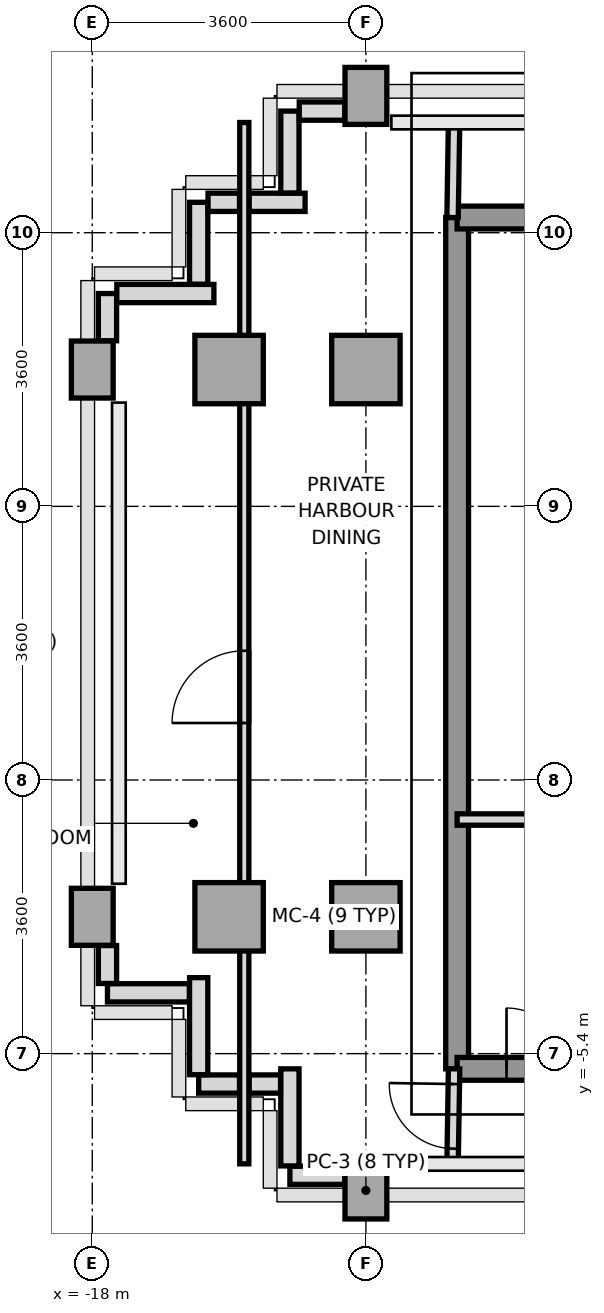
"""IFC4 building model, lengths in metres.
Left out: names, types, materials, properties, quantities, classifications, styles, units other than length and angle.
Written with IfcOpenShell. Run it as: python <this file> out.ifc"""

import sys

from ifc_helpers import new_model, si_unit, direction, frame, frame_2d, origin, origin_2d, place, context, subcontext, project, spatial, rectangle, extrude, source, transform, mapped, element, fill, save


model = new_model("IFC4")
c1 = context("Model", 3, precision=1e-05, world=origin(), true_north=direction((0.0, 1.0)))
c2 = subcontext(c1, "Body", "Model", "MODEL_VIEW")
j1 = project(units=[si_unit("LENGTHUNIT", "METRE"), si_unit("PLANEANGLEUNIT", "RADIAN")], contexts=[c1])
p1 = place(None, origin())
s1 = spatial("IfcSite", under=j1, at=p1, CompositionType="ELEMENT")
p2 = place(p1, origin())
s2 = spatial("IfcBuilding", under=s1, at=p2, CompositionType="ELEMENT")
p3 = place(p2, frame((0.0, 0.0, 249.2)))
s3 = spatial("IfcBuildingStorey", under=s2, at=p3, CompositionType="ELEMENT", Elevation=249.2)
m1 = source(origin(), c2, "Body", "SweptSolid", [
    extrude(rectangle(XDim=0.55, YDim=0.75, at=origin_2d()), origin(), (0.0, 0.0, 1.0), 3.01),
])
for number, where, z_axis, x_axis in (
    (1, (-18.0, -3.6, 0.0), (0.0, 0.0, 1.0), (1.0, 0.0, 0.0)),
    (2, (-18.0, 3.6, 0.0), (0.0, 0.0, 1.0), (1.0, 0.0, 0.0)),
):
    element("IfcColumn", number, at=place(p3, frame(where, z_axis=z_axis, x_axis=x_axis)), inside=s3, PredefinedType="COLUMN", context=c2, shape_type="MappedRepresentation", body=[
        mapped(m1, transform((0.0, 0.0, 0.0), x_axis=(1.0, 0.0, 0.0), y_axis=(0.0, 1.0, 0.0), z_axis=(0.0, 0.0, 1.0), scale=1.0)),
    ])
m2 = source(origin(), c2, "Body", "SweptSolid", [
    extrude(rectangle(XDim=0.9, YDim=0.9, at=origin_2d()), origin(), (0.0, 0.0, 1.0), 3.01),
])
for number, where, z_axis, x_axis in (
    (3, (-16.2, -3.6, 0.0), (0.0, 0.0, 1.0), (1.0, 0.0, 0.0)),
    (4, (-16.2, 3.6, 0.0), (0.0, 0.0, 1.0), (1.0, 0.0, 0.0)),
):
    element("IfcColumn", number, at=place(p3, frame(where, z_axis=z_axis, x_axis=x_axis)), inside=s3, PredefinedType="COLUMN", context=c2, shape_type="MappedRepresentation", body=[
        mapped(m2, transform((0.0, 0.0, 0.0), x_axis=(1.0, 0.0, 0.0), y_axis=(0.0, 1.0, 0.0), z_axis=(0.0, 0.0, 1.0), scale=1.0)),
    ])
p4 = place(p3, frame((-14.4, -7.2, 0.0), z_axis=(0.0, 0.0, 1.0), x_axis=(1.0, 0.0, 0.0)))
e5 = element("IfcColumn", 5, at=p4, inside=s3, PredefinedType="COLUMN", context=c2, shape_type="MappedRepresentation", body=[
    mapped(m1, transform((0.0, 0.0, 0.0), x_axis=(1.0, 0.0, 0.0), y_axis=(0.0, 1.0, 0.0), z_axis=(0.0, 0.0, 1.0), scale=1.0)),
])
for number, where, z_axis, x_axis in (
    (6, (-14.4, -3.6, 0.0), (0.0, 0.0, 1.0), (1.0, 0.0, 0.0)),
    (7, (-14.4, 3.6, 0.0), (0.0, 0.0, 1.0), (1.0, 0.0, 0.0)),
):
    element("IfcColumn", number, at=place(p3, frame(where, z_axis=z_axis, x_axis=x_axis)), inside=s3, PredefinedType="COLUMN", context=c2, shape_type="MappedRepresentation", body=[
        mapped(m2, transform((0.0, 0.0, 0.0), x_axis=(1.0, 0.0, 0.0), y_axis=(0.0, 1.0, 0.0), z_axis=(0.0, 0.0, 1.0), scale=1.0)),
    ])
p5 = place(p3, frame((-14.4, 7.2, 0.0), z_axis=(0.0, 0.0, 1.0), x_axis=(1.0, 0.0, 0.0)))
e8 = element("IfcColumn", 8, at=p5, inside=s3, PredefinedType="COLUMN", context=c2, shape_type="MappedRepresentation", body=[
    mapped(m1, transform((0.0, 0.0, 0.0), x_axis=(1.0, 0.0, 0.0), y_axis=(0.0, 1.0, 0.0), z_axis=(0.0, 0.0, 1.0), scale=1.0)),
])
p6 = place(p3, frame((-14.678, -7.0, 0.0), z_axis=(0.0, 0.0, 1.0), x_axis=(-1.0, 0.0, 0.0)))
e9 = element("IfcWall", 9, at=p6, inside=s3, PredefinedType="PARAPET", context=c2, shape_type="SweptSolid", body=[
    extrude(rectangle(XDim=0.722, YDim=0.24, at=frame_2d((0.361, 0.0))), origin(), (0.0, 0.0, 1.0), 1.15),
])
p7 = place(p3, frame((-15.4, -6.877, 0.0), z_axis=(0.0, 0.0, 1.0), x_axis=(0.0, 1.0, 0.0)))
e10 = element("IfcWall", 10, at=p7, inside=s3, PredefinedType="PARAPET", context=c2, shape_type="SweptSolid", body=[
    extrude(rectangle(XDim=1.277, YDim=0.24, at=frame_2d((0.638, 0.0))), origin(), (0.0, 0.0, 1.0), 1.15),
])
p8 = place(p3, frame((-15.523, -5.8, 0.0), z_axis=(0.0, 0.0, 1.0), x_axis=(-1.0, 0.0, 0.0)))
e11 = element("IfcWall", 11, at=p8, inside=s3, PredefinedType="PARAPET", context=c2, shape_type="SweptSolid", body=[
    extrude(rectangle(XDim=0.414, YDim=0.24, at=frame_2d((0.207, 0.0))), origin(), (0.0, 0.0, 1.0), 1.15),
])
p9 = place(p3, frame((-16.063, -5.8, 0.0), z_axis=(0.0, 0.0, 1.0), x_axis=(-1.0, 0.0, 0.0)))
e12 = element("IfcWall", 12, at=p9, inside=s3, PredefinedType="PARAPET", context=c2, shape_type="SweptSolid", body=[
    extrude(rectangle(XDim=0.537, YDim=0.24, at=frame_2d((0.269, 0.0))), origin(), (0.0, 0.0, 1.0), 1.15),
])
p10 = place(p3, frame((-16.6, -5.677, 0.0), z_axis=(0.0, 0.0, 1.0), x_axis=(0.0, 1.0, 0.0)))
e13 = element("IfcWall", 13, at=p10, inside=s3, PredefinedType="PARAPET", context=c2, shape_type="SweptSolid", body=[
    extrude(rectangle(XDim=1.277, YDim=0.24, at=frame_2d((0.639, 0.0))), origin(), (0.0, 0.0, 1.0), 1.15),
])
p11 = place(p3, frame((-16.723, -4.6, 0.0), z_axis=(0.0, 0.0, 1.0), x_axis=(-1.0, 0.0, 0.0)))
e14 = element("IfcWall", 14, at=p11, inside=s3, PredefinedType="PARAPET", context=c2, shape_type="SweptSolid", body=[
    extrude(rectangle(XDim=1.077, YDim=0.24, at=frame_2d((0.539, 0.0))), origin(), (0.0, 0.0, 1.0), 1.15),
])
p12 = place(p3, frame((-17.8, -4.477, 0.0), z_axis=(0.0, 0.0, 1.0), x_axis=(0.0, 1.0, 0.0)))
e15 = element("IfcWall", 15, at=p12, inside=s3, PredefinedType="PARAPET", context=c2, shape_type="SweptSolid", body=[
    extrude(rectangle(XDim=0.499, YDim=0.24, at=frame_2d((0.25, 0.0))), origin(), (0.0, 0.0, 1.0), 1.15),
])
p13 = place(p3, frame((-17.8, 3.978, 0.0), z_axis=(0.0, 0.0, 1.0), x_axis=(0.0, 1.0, 0.0)))
e16 = element("IfcWall", 16, at=p13, inside=s3, PredefinedType="PARAPET", context=c2, shape_type="SweptSolid", body=[
    extrude(rectangle(XDim=0.622, YDim=0.24, at=frame_2d((0.311, 0.0))), origin(), (0.0, 0.0, 1.0), 1.15),
])
p14 = place(p3, frame((-17.677, 4.6, 0.0), z_axis=(0.0, 0.0, 1.0), x_axis=(1.0, 0.0, 0.0)))
e17 = element("IfcWall", 17, at=p14, inside=s3, PredefinedType="PARAPET", context=c2, shape_type="SweptSolid", body=[
    extrude(rectangle(XDim=1.277, YDim=0.24, at=frame_2d((0.639, 0.0))), origin(), (0.0, 0.0, 1.0), 1.15),
])
p15 = place(p3, frame((-16.6, 4.723, 0.0), z_axis=(0.0, 0.0, 1.0), x_axis=(0.0, 1.0, 0.0)))
e18 = element("IfcWall", 18, at=p15, inside=s3, PredefinedType="PARAPET", context=c2, shape_type="SweptSolid", body=[
    extrude(rectangle(XDim=1.077, YDim=0.24, at=frame_2d((0.539, 0.0))), origin(), (0.0, 0.0, 1.0), 1.15),
])
p16 = place(p3, frame((-16.477, 5.8, 0.0), z_axis=(0.0, 0.0, 1.0), x_axis=(1.0, 0.0, 0.0)))
e19 = element("IfcWall", 19, at=p16, inside=s3, PredefinedType="PARAPET", context=c2, shape_type="SweptSolid", body=[
    extrude(rectangle(XDim=0.414, YDim=0.24, at=frame_2d((0.207, 0.0))), origin(), (0.0, 0.0, 1.0), 1.15),
])
p17 = place(p3, frame((-15.937, 5.8, 0.0), z_axis=(0.0, 0.0, 1.0), x_axis=(1.0, 0.0, 0.0)))
e20 = element("IfcWall", 20, at=p17, inside=s3, PredefinedType="PARAPET", context=c2, shape_type="SweptSolid", body=[
    extrude(rectangle(XDim=0.737, YDim=0.24, at=frame_2d((0.369, 0.0))), origin(), (0.0, 0.0, 1.0), 1.15),
])
p18 = place(p3, frame((-15.4, 5.923, 0.0), z_axis=(0.0, 0.0, 1.0), x_axis=(0.0, 1.0, 0.0)))
e21 = element("IfcWall", 21, at=p18, inside=s3, PredefinedType="PARAPET", context=c2, shape_type="SweptSolid", body=[
    extrude(rectangle(XDim=1.077, YDim=0.24, at=frame_2d((0.539, 0.0))), origin(), (0.0, 0.0, 1.0), 1.15),
])
p19 = place(p3, frame((-15.277, 7.0, 0.0), z_axis=(0.0, 0.0, 1.0), x_axis=(1.0, 0.0, 0.0)))
e22 = element("IfcWall", 22, at=p19, inside=s3, PredefinedType="PARAPET", context=c2, shape_type="SweptSolid", body=[
    extrude(rectangle(XDim=0.599, YDim=0.24, at=frame_2d((0.3, 0.0))), origin(), (0.0, 0.0, 1.0), 1.15),
])
p20 = place(p3, frame((-13.2, -5.6, 0.0), z_axis=(0.0, 0.0, 1.0), x_axis=(0.0, 1.0, 0.0)))
e23 = element("IfcWall", 23, at=p20, inside=s3, PredefinedType="SHEAR", context=c2, shape_type="SweptSolid", body=[
    extrude(rectangle(XDim=11.2, YDim=0.3, at=frame_2d((5.6, 0.0))), origin(), (0.0, 0.0, 1.0), 3.01),
])
p21 = place(p3, frame((-13.2, 5.6, 0.0), z_axis=(0.0, 0.0, 1.0), x_axis=(1.0, 0.0, 0.0)))
e24 = element("IfcWall", 24, at=p21, inside=s3, PredefinedType="SHEAR", context=c2, shape_type="SweptSolid", body=[
    extrude(rectangle(XDim=1.844, YDim=0.3, at=frame_2d((0.922, 0.0))), origin(), (0.0, 0.0, 1.0), 3.01),
])
p22 = place(p3, frame((-13.2, -5.6, 0.0), z_axis=(0.0, 0.0, 1.0), x_axis=(1.0, 0.0, 0.0)))
e25 = element("IfcWall", 25, at=p22, inside=s3, PredefinedType="SHEAR", context=c2, shape_type="SweptSolid", body=[
    extrude(rectangle(XDim=7.8, YDim=0.3, at=frame_2d((3.9, 0.0))), origin(), (0.0, 0.0, 1.0), 3.01),
])
p23 = place(p22, frame((0.65, 0.0, 0.0)))
e26 = element("IfcOpeningElement", 26, at=p23, cuts=e25, PredefinedType="OPENING", context=c2, shape_type="SweptSolid", body=[
    extrude(rectangle(XDim=0.8, YDim=2.1, at=frame_2d((0.4, 1.05))), frame((0.0, 0.16, 0.0), z_axis=(0.0, -1.0, 0.0), x_axis=(1.0, 0.0, 0.0)), (0.0, 0.0, 1.0), 0.32),
])
p24 = place(p22, frame((4.2, 0.0, 0.0)))
e27 = element("IfcOpeningElement", 27, at=p24, cuts=e25, PredefinedType="OPENING", context=c2, shape_type="SweptSolid", body=[
    extrude(rectangle(XDim=0.95, YDim=2.15, at=frame_2d((0.475, 1.075))), frame((0.0, 0.16, 0.0), z_axis=(0.0, -1.0, 0.0), x_axis=(1.0, 0.0, 0.0)), (0.0, 0.0, 1.0), 0.32),
])
p25 = place(p3, frame((-13.2, -2.32, 0.0), z_axis=(0.0, 0.0, 1.0), x_axis=(1.0, 0.0, 0.0)))
e28 = element("IfcWall", 28, at=p25, inside=s3, PredefinedType="PARTITIONING", context=c2, shape_type="SweptSolid", body=[
    extrude(rectangle(XDim=2.18, YDim=0.15, at=frame_2d((1.09, 0.0))), origin(), (0.0, 0.0, 1.0), 3.01),
])
p26 = place(p3, frame((-13.26, 5.6, 0.0), z_axis=(0.0, 0.0, 1.0), x_axis=(0.016013571389, 0.999871774545, 0.0)))
e29 = element("IfcWall", 29, at=p26, inside=s3, PredefinedType="PARTITIONING", context=c2, shape_type="SweptSolid", body=[
    extrude(rectangle(XDim=1.25, YDim=0.15, at=frame_2d((0.625, 0.0))), origin(), (0.0, 0.0, 1.0), 3.01),
])
p27 = place(p3, frame((-13.26, -6.85, 0.0), z_axis=(0.0, 0.0, 1.0), x_axis=(0.016013571389, 0.999871774545, 0.0)))
e30 = element("IfcWall", 30, at=p27, inside=s3, PredefinedType="PARTITIONING", context=c2, shape_type="SweptSolid", body=[
    extrude(rectangle(XDim=1.25, YDim=0.15, at=frame_2d((0.625, 0.0))), origin(), (0.0, 0.0, 1.0), 3.01),
])
p28 = place(p27, frame((0.2, 0.0, 0.0)))
e31 = element("IfcOpeningElement", 31, at=p28, cuts=e30, PredefinedType="OPENING", context=c2, shape_type="SweptSolid", body=[
    extrude(rectangle(XDim=0.85, YDim=2.1, at=frame_2d((0.425, 1.05))), frame((0.0, 0.085, 0.0), z_axis=(0.0, -1.0, 0.0), x_axis=(1.0, 0.0, 0.0)), (0.0, 0.0, 1.0), 0.17),
])
p29 = place(p3, frame((-16.0, -6.85, 0.0), z_axis=(0.0, 0.0, 1.0), x_axis=(0.0, 1.0, 0.0)))
e32 = element("IfcWall", 32, at=p29, inside=s3, PredefinedType="PARTITIONING", context=c2, shape_type="SweptSolid", body=[
    extrude(rectangle(XDim=13.7, YDim=0.12, at=frame_2d((6.85, 0.0))), origin(), (0.0, 0.0, 1.0), 2.33),
])
p30 = place(p29, frame((5.8, 0.0, 0.0)))
e33 = element("IfcOpeningElement", 33, at=p30, cuts=e32, PredefinedType="OPENING", context=c2, shape_type="SweptSolid", body=[
    extrude(rectangle(XDim=0.95, YDim=2.15, at=frame_2d((0.475, 1.075))), frame((0.0, 0.07, 0.0), z_axis=(0.0, -1.0, 0.0), x_axis=(1.0, 0.0, 0.0)), (0.0, 0.0, 1.0), 0.14),
])
m3 = source(origin(), c2, "Body", "SweptSolid", [
    extrude(rectangle(XDim=0.8, YDim=2.1, at=frame_2d((0.4, 1.05))), frame((0.0, 0.025, 0.0), z_axis=(0.0, -1.0, 0.0), x_axis=(1.0, 0.0, 0.0)), (0.0, 0.0, 1.0), 0.05),
])
p31 = place(p23, origin())
e34 = element("IfcDoor", 34, at=p31, inside=s3, OperationType="SINGLE_SWING_LEFT", PredefinedType="DOOR", context=c2, shape_type="MappedRepresentation", body=[
    mapped(m3, transform((0.0, 0.0, 0.0), x_axis=(1.0, 0.0, 0.0), y_axis=(0.0, 1.0, 0.0), z_axis=(0.0, 0.0, 1.0), scale=1.0)),
])
fill(e26, e34)
m4 = source(origin(), c2, "Body", "SweptSolid", [
    extrude(rectangle(XDim=0.85, YDim=2.1, at=frame_2d((0.425, 1.05))), frame((0.0, 0.025, 0.0), z_axis=(0.0, -1.0, 0.0), x_axis=(1.0, 0.0, 0.0)), (0.0, 0.0, 1.0), 0.05),
])
p32 = place(p28, origin())
e35 = element("IfcDoor", 35, at=p32, inside=s3, OperationType="SINGLE_SWING_RIGHT", PredefinedType="DOOR", context=c2, shape_type="MappedRepresentation", body=[
    mapped(m4, transform((0.0, 0.0, 0.0), x_axis=(1.0, 0.0, 0.0), y_axis=(0.0, 1.0, 0.0), z_axis=(0.0, 0.0, 1.0), scale=1.0)),
])
fill(e31, e35)
m5 = source(origin(), c2, "Body", "SweptSolid", [
    extrude(rectangle(XDim=0.95, YDim=2.15, at=frame_2d((0.475, 1.075))), frame((0.0, 0.025, 0.0), z_axis=(0.0, -1.0, 0.0), x_axis=(1.0, 0.0, 0.0)), (0.0, 0.0, 1.0), 0.05),
])
p33 = place(p30, origin())
e36 = element("IfcDoor", 36, at=p33, inside=s3, OperationType="SINGLE_SWING_LEFT", PredefinedType="DOOR", context=c2, shape_type="MappedRepresentation", body=[
    mapped(m5, transform((0.0, 0.0, 0.0), x_axis=(1.0, 0.0, 0.0), y_axis=(0.0, 1.0, 0.0), z_axis=(0.0, 0.0, 1.0), scale=1.0)),
])
fill(e33, e36)
save(model, sys.argv[1])
